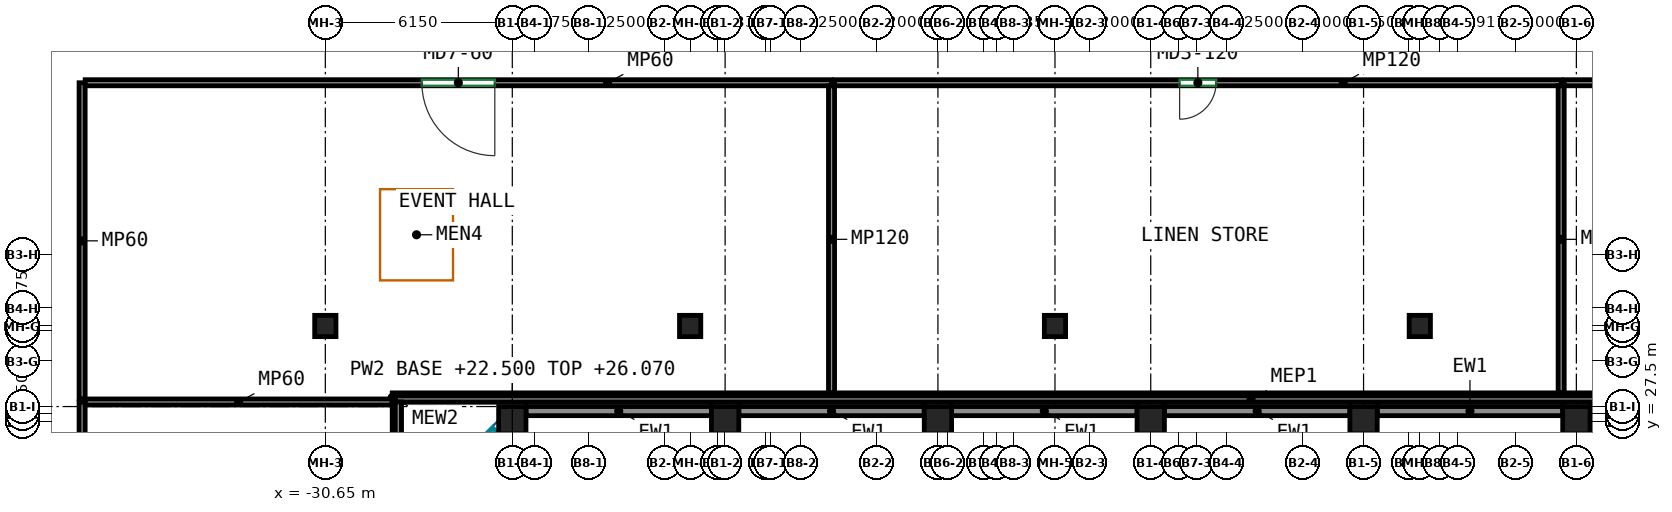
"""IFC4 building model, lengths in metres.
Left out: names, types, materials, properties, quantities, classifications, styles, units other than length and angle.
Written with IfcOpenShell. Run it as: python <this file> out.ifc"""

import sys

from ifc_helpers import new_model, si_unit, direction, frame, frame_2d, origin, origin_2d, place, context, subcontext, project, spatial, rectangle, extrude, source, transform, mapped, element, fill, save


model = new_model("IFC4")
c1 = context("Model", 3, precision=1e-05, world=origin(), true_north=direction((0.0, 1.0)))
c2 = subcontext(c1, "Body", "Model", "MODEL_VIEW")
j1 = project(units=[si_unit("LENGTHUNIT", "METRE"), si_unit("PLANEANGLEUNIT", "RADIAN")], contexts=[c1])
p1 = place(None, origin())
s1 = spatial("IfcSite", under=j1, at=p1, CompositionType="ELEMENT")
p2 = place(p1, origin())
s2 = spatial("IfcBuilding", under=s1, at=p2, CompositionType="ELEMENT")
p3 = place(p2, frame((0.0, 0.0, 22.5)))
s3 = spatial("IfcBuildingStorey", under=s2, at=p3, CompositionType="ELEMENT", Elevation=22.5)
m1 = source(origin(), c2, "Body", "SweptSolid", [
    extrude(rectangle(XDim=0.9, YDim=0.9, at=origin_2d()), origin(), (0.0, 0.0, 1.0), 4.22),
])
for number, where, z_axis, x_axis in (
    (1, (-24.5, 27.55, 0.0), (0.0, 0.0, 1.0), (1.0, 0.0, 0.0)),
    (2, (-17.5, 27.55, 0.0), (0.0, 0.0, 1.0), (1.0, 0.0, 0.0)),
    (3, (-10.5, 27.55, 0.0), (0.0, 0.0, 1.0), (1.0, 0.0, 0.0)),
    (4, (-3.5, 27.55, 0.0), (0.0, 0.0, 1.0), (1.0, 0.0, 0.0)),
    (5, (3.5, 27.55, 0.0), (0.0, 0.0, 1.0), (1.0, 0.0, 0.0)),
    (6, (10.5, 27.55, 0.0), (0.0, 0.0, 1.0), (1.0, 0.0, 0.0)),
):
    element("IfcColumn", number, at=place(p3, frame(where, z_axis=z_axis, x_axis=x_axis)), inside=s3, PredefinedType="COLUMN", context=c2, shape_type="MappedRepresentation", body=[
        mapped(m1, transform((0.0, 0.0, 0.0))),
    ])
m2 = source(origin(), c2, "Body", "SweptSolid", [
    extrude(rectangle(XDim=0.7, YDim=0.7, at=origin_2d()), origin(), (0.0, 0.0, 1.0), 4.22),
])
for number, where, z_axis, x_axis in (
    (7, (-30.65, 30.65, 0.0), (0.0, 0.0, 1.0), (1.0, 0.0, 0.0)),
    (8, (-18.65, 30.65, 0.0), (0.0, 0.0, 1.0), (1.0, 0.0, 0.0)),
    (9, (-6.65, 30.65, 0.0), (0.0, 0.0, 1.0), (1.0, 0.0, 0.0)),
    (10, (5.35, 30.65, 0.0), (0.0, 0.0, 1.0), (1.0, 0.0, 0.0)),
):
    element("IfcColumn", number, at=place(p3, frame(where, z_axis=z_axis, x_axis=x_axis)), inside=s3, PredefinedType="COLUMN", context=c2, shape_type="MappedRepresentation", body=[
        mapped(m2, transform((0.0, 0.0, 0.0))),
    ])
m3 = source(origin(), c2, "Body", "SweptSolid", [
    extrude(rectangle(XDim=6.1, YDim=0.3, at=frame_2d((3.05, 0.0))), origin(), (0.0, 0.0, 1.0), 4.22),
])
for number, where, z_axis, x_axis in (
    (11, (17.05, 27.85, 0.0), (0.0, 0.0, 1.0), (-1.0, 0.0, 0.0)),
    (12, (10.05, 27.85, 0.0), (0.0, 0.0, 1.0), (-1.0, 0.0, 0.0)),
    (13, (3.05, 27.85, 0.0), (0.0, 0.0, 1.0), (-1.0, 0.0, 0.0)),
    (14, (-3.95, 27.85, 0.0), (0.0, 0.0, 1.0), (-1.0, 0.0, 0.0)),
    (15, (-10.95, 27.85, 0.0), (0.0, 0.0, 1.0), (-1.0, 0.0, 0.0)),
    (16, (-17.95, 27.85, 0.0), (0.0, 0.0, 1.0), (-1.0, 0.0, 0.0)),
):
    element("IfcWall", number, at=place(p3, frame(where, z_axis=z_axis, x_axis=x_axis)), inside=s3, PredefinedType="SOLIDWALL", context=c2, shape_type="MappedRepresentation", body=[
        mapped(m3, transform((0.0, 0.0, 0.0))),
    ])
m4 = source(origin(), c2, "Body", "SweptSolid", [
    extrude(rectangle(XDim=56.3, YDim=0.3, at=frame_2d((28.15, 0.0))), origin(), (0.0, 0.0, 1.0), 4.22),
])
p4 = place(p3, frame((27.85, 28.3, 0.0), z_axis=(0.0, 0.0, 1.0), x_axis=(-1.0, 0.0, 0.0)))
e17 = element("IfcWall", 17, at=p4, inside=s3, PredefinedType="SOLIDWALL", context=c2, shape_type="MappedRepresentation", body=[
    mapped(m4, transform((0.0, 0.0, 0.0))),
])
m5 = source(origin(), c2, "Body", "SweptSolid", [
    extrude(rectangle(XDim=56.3, YDim=0.3, at=frame_2d((28.15, 0.0))), origin(), (0.0, 0.0, 1.0), 4.22),
])
p5 = place(p3, frame((-28.3, 28.15, 0.0), z_axis=(0.0, 0.0, 1.0), x_axis=(0.0, -1.0, 0.0)))
e18 = element("IfcWall", 18, at=p5, inside=s3, PredefinedType="SOLIDWALL", context=c2, shape_type="MappedRepresentation", body=[
    mapped(m5, transform((0.0, 0.0, 0.0))),
])
m6 = source(origin(), c2, "Body", "SweptSolid", [
    extrude(rectangle(XDim=56.3, YDim=0.2, at=frame_2d((28.15, 0.0))), origin(), (0.0, 0.0, 1.0), 1.1),
])
p6 = place(p3, frame((27.95, 28.25, 4.5), z_axis=(0.0, 0.0, 1.0), x_axis=(-1.0, 0.0, 0.0)))
e19 = element("IfcWall", 19, at=p6, inside=s3, PredefinedType="PARAPET", context=c2, shape_type="MappedRepresentation", body=[
    mapped(m6, transform((0.0, 0.0, 0.0))),
])
m7 = source(origin(), c2, "Body", "SweptSolid", [
    extrude(rectangle(XDim=56.3, YDim=0.2, at=frame_2d((28.15, 0.0))), origin(), (0.0, 0.0, 1.0), 1.1),
])
p7 = place(p3, frame((-28.25, 28.15, 4.5), z_axis=(0.0, 0.0, 1.0), x_axis=(0.0, -1.0, 0.0)))
e20 = element("IfcWall", 20, at=p7, inside=s3, PredefinedType="PARAPET", context=c2, shape_type="MappedRepresentation", body=[
    mapped(m7, transform((0.0, 0.0, 0.0))),
])
m8 = source(origin(), c2, "Body", "SweptSolid", [
    extrude(rectangle(XDim=18.05, YDim=0.2, at=frame_2d((9.025, 0.0))), origin(), (0.0, 0.0, 1.0), 3.42),
])
p8 = place(p3, frame((-38.65, 28.15, 0.0), z_axis=(0.0, 0.0, 1.0), x_axis=(0.0, -1.0, 0.0)))
e21 = element("IfcWall", 21, at=p8, inside=s3, PredefinedType="PARTITIONING", context=c2, shape_type="MappedRepresentation", body=[
    mapped(m8, transform((0.0, 0.0, 0.0))),
])
p9 = place(p8, frame((7.825, 0.0, 0.0)))
e22 = element("IfcOpeningElement", 22, at=p9, cuts=e21, PredefinedType="OPENING", context=c2, shape_type="SweptSolid", body=[
    extrude(rectangle(XDim=2.4, YDim=2.4, at=frame_2d((1.2, 1.2))), frame((0.0, 0.11, 0.0), z_axis=(0.0, -1.0, 0.0), x_axis=(1.0, 0.0, 0.0)), (0.0, 0.0, 1.0), 0.22),
])
m9 = source(origin(), c2, "Body", "SweptSolid", [
    extrude(rectangle(XDim=10.1, YDim=0.2, at=frame_2d((5.05, 0.0))), origin(), (0.0, 0.0, 1.0), 3.42),
])
p10 = place(p3, frame((-38.55, 28.15, 0.0), z_axis=(0.0, 0.0, 1.0), x_axis=(1.0, 0.0, 0.0)))
e23 = element("IfcWall", 23, at=p10, inside=s3, PredefinedType="PARTITIONING", context=c2, shape_type="MappedRepresentation", body=[
    mapped(m9, transform((0.0, 0.0, 0.0))),
])
m10 = source(origin(), c2, "Body", "SweptSolid", [
    extrude(rectangle(XDim=10.4, YDim=0.2, at=frame_2d((5.2, 0.0))), origin(), (0.0, 0.0, 1.0), 3.42),
])
p11 = place(p3, frame((-38.65, 38.65, 0.0), z_axis=(0.0, 0.0, 1.0), x_axis=(0.0, -1.0, 0.0)))
e24 = element("IfcWall", 24, at=p11, inside=s3, PredefinedType="PARTITIONING", context=c2, shape_type="MappedRepresentation", body=[
    mapped(m10, transform((0.0, 0.0, 0.0))),
])
m11 = source(origin(), c2, "Body", "SweptSolid", [
    extrude(rectangle(XDim=24.55, YDim=0.2, at=frame_2d((12.275, 0.0))), origin(), (0.0, 0.0, 1.0), 3.42),
])
p12 = place(p3, frame((-14.0, 38.65, 0.0), z_axis=(0.0, 0.0, 1.0), x_axis=(-1.0, 0.0, 0.0)))
e25 = element("IfcWall", 25, at=p12, inside=s3, PredefinedType="PARTITIONING", context=c2, shape_type="MappedRepresentation", body=[
    mapped(m11, transform((0.0, 0.0, 0.0))),
])
p13 = place(p12, frame((11.075, 0.0, 0.0)))
e26 = element("IfcOpeningElement", 26, at=p13, cuts=e25, PredefinedType="OPENING", context=c2, shape_type="SweptSolid", body=[
    extrude(rectangle(XDim=2.4, YDim=2.4, at=frame_2d((1.2, 1.2))), frame((0.0, 0.11, 0.0), z_axis=(0.0, -1.0, 0.0), x_axis=(1.0, 0.0, 0.0)), (0.0, 0.0, 1.0), 0.22),
])
p14 = place(p3, frame((-14.0, 38.55, 0.0), z_axis=(0.0, 0.0, 1.0), x_axis=(0.0, -1.0, 0.0)))
e27 = element("IfcWall", 27, at=p14, inside=s3, PredefinedType="PARTITIONING", context=c2, shape_type="MappedRepresentation", body=[
    mapped(m9, transform((0.0, 0.0, 0.0))),
])
m12 = source(origin(), c2, "Body", "SweptSolid", [
    extrude(rectangle(XDim=23.9, YDim=0.2, at=frame_2d((11.95, 0.0))), origin(), (0.0, 0.0, 1.0), 3.42),
])
p15 = place(p3, frame((10.0, 38.65, 0.0), z_axis=(0.0, 0.0, 1.0), x_axis=(-1.0, 0.0, 0.0)))
e28 = element("IfcWall", 28, at=p15, inside=s3, PredefinedType="PARTITIONING", context=c2, shape_type="MappedRepresentation", body=[
    mapped(m12, transform((0.0, 0.0, 0.0))),
])
p16 = place(p15, frame((11.35, 0.0, 0.0)))
e29 = element("IfcOpeningElement", 29, at=p16, cuts=e28, PredefinedType="OPENING", context=c2, shape_type="SweptSolid", body=[
    extrude(rectangle(XDim=1.2, YDim=2.1, at=frame_2d((0.6, 1.05))), frame((0.0, 0.11, 0.0), z_axis=(0.0, -1.0, 0.0), x_axis=(1.0, 0.0, 0.0)), (0.0, 0.0, 1.0), 0.22),
])
p17 = place(p3, frame((10.0, 38.55, 0.0), z_axis=(0.0, 0.0, 1.0), x_axis=(0.0, -1.0, 0.0)))
e30 = element("IfcWall", 30, at=p17, inside=s3, PredefinedType="PARTITIONING", context=c2, shape_type="MappedRepresentation", body=[
    mapped(m9, transform((0.0, 0.0, 0.0))),
])
m13 = source(origin(), c2, "Body", "SweptSolid", [
    extrude(rectangle(XDim=17.75, YDim=0.2, at=frame_2d((8.875, 0.0))), origin(), (0.0, 0.0, 1.0), 3.42),
])
p18 = place(p3, frame((27.85, 38.65, 0.0), z_axis=(0.0, 0.0, 1.0), x_axis=(-1.0, 0.0, 0.0)))
e31 = element("IfcWall", 31, at=p18, inside=s3, PredefinedType="PARTITIONING", context=c2, shape_type="MappedRepresentation", body=[
    mapped(m13, transform((0.0, 0.0, 0.0))),
])
p19 = place(p18, frame((7.675, 0.0, 0.0)))
e32 = element("IfcOpeningElement", 32, at=p19, cuts=e31, PredefinedType="OPENING", context=c2, shape_type="SweptSolid", body=[
    extrude(rectangle(XDim=2.4, YDim=2.4, at=frame_2d((1.2, 1.2))), frame((0.0, 0.11, 0.0), z_axis=(0.0, -1.0, 0.0), x_axis=(1.0, 0.0, 0.0)), (0.0, 0.0, 1.0), 0.22),
])
p20 = place(p2, frame((0.0, 0.0, 27.0)))
p21 = place(p20, frame((0.0, 0.0, -0.28)))
p22 = place(p21, frame((-27.65, 33.65, 0.0)))
p23 = place(p22, frame((0.0, 0.0, 0.23)))
e33 = element("IfcWindow", 33, at=p23, inside=s3, PartitioningType="SINGLE_PANEL", PredefinedType="SKYLIGHT", context=c2, shape_type="SweptSolid", body=[
    extrude(rectangle(XDim=2.4, YDim=3.0, at=origin_2d()), origin(), (0.0, 0.0, 1.0), 0.05),
])
p24 = place(p13, origin())
e34 = element("IfcDoor", 34, at=p24, inside=s3, OperationType="DOUBLE_DOOR_SINGLE_SWING", PredefinedType="DOOR", context=c2, shape_type="SweptSolid", body=[
    extrude(rectangle(XDim=2.4, YDim=2.4, at=frame_2d((1.2, 1.2))), frame((0.0, 0.025, 0.0), z_axis=(0.0, -1.0, 0.0), x_axis=(1.0, 0.0, 0.0)), (0.0, 0.0, 1.0), 0.05),
])
fill(e26, e34)
p25 = place(p16, origin())
e35 = element("IfcDoor", 35, at=p25, inside=s3, OperationType="SINGLE_SWING_RIGHT", PredefinedType="DOOR", context=c2, shape_type="SweptSolid", body=[
    extrude(rectangle(XDim=1.2, YDim=2.1, at=frame_2d((0.6, 1.05))), frame((0.0, 0.025, 0.0), z_axis=(0.0, -1.0, 0.0), x_axis=(1.0, 0.0, 0.0)), (0.0, 0.0, 1.0), 0.05),
])
fill(e29, e35)
save(model, sys.argv[1])
